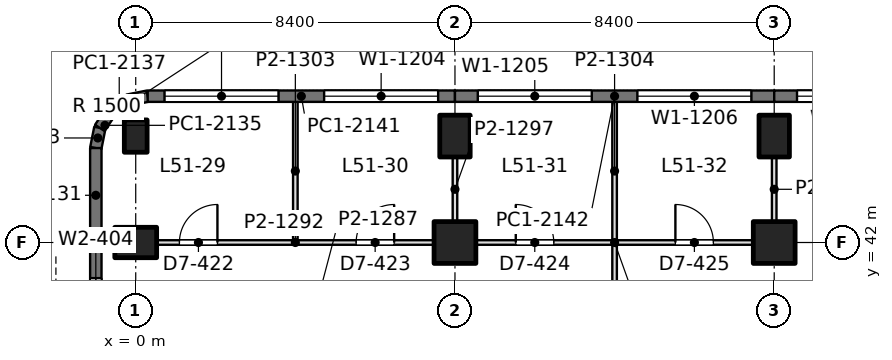
"""IFC4 building model, lengths in metres.
Left out: names, types, materials, properties, quantities, classifications, styles, units other than length and angle.
Written with IfcOpenShell. Run it as: python <this file> out.ifc"""

import sys

from ifc_helpers import new_model, si_unit, direction, frame, frame_2d, origin, origin_2d, place, context, subcontext, project, spatial, rectangle, extrude, element, fill, save


model = new_model("IFC4")
c1 = context("Model", 3, precision=1e-05, world=origin(), true_north=direction((0.0, 1.0)))
c2 = subcontext(c1, "Body", "Model", "MODEL_VIEW")
j1 = project(units=[si_unit("LENGTHUNIT", "METRE"), si_unit("PLANEANGLEUNIT", "RADIAN")], contexts=[c1])
p1 = place(None, origin())
s1 = spatial("IfcSite", under=j1, at=p1, CompositionType="ELEMENT")
p2 = place(p1, origin())
s2 = spatial("IfcBuilding", under=s1, at=p2, CompositionType="ELEMENT")
p3 = place(p2, frame((0.0, 0.0, 223.8)))
s3 = spatial("IfcBuildingStorey", under=s2, at=p3, CompositionType="ELEMENT", Elevation=223.8)
p4 = place(p3, frame((0.0, 42.0, 0.0), z_axis=(0.0, 0.0, 1.0), x_axis=(0.0, 1.0, 0.0)))
e1 = element("IfcColumn", 1, at=p4, inside=s3, PredefinedType="COLUMN", context=c2, shape_type="SweptSolid", body=[
    extrude(rectangle(XDim=0.8, YDim=1.1, at=origin_2d()), origin(), (0.0, 0.0, 1.0), 4.2),
])
p5 = place(p3, frame((0.0, 44.8, 0.0), z_axis=(0.0, 0.0, 1.0), x_axis=(1.0, 0.0, 0.0)))
e2 = element("IfcColumn", 2, at=p5, inside=s3, PredefinedType="COLUMN", context=c2, shape_type="SweptSolid", body=[
    extrude(rectangle(XDim=0.6, YDim=0.85, at=origin_2d()), origin(), (0.0, 0.0, 1.0), 4.2),
])
p6 = place(p3, frame((8.4, 42.0, 0.0), z_axis=(0.0, 0.0, 1.0), x_axis=(1.0, 0.0, 0.0)))
e3 = element("IfcColumn", 3, at=p6, inside=s3, PredefinedType="COLUMN", context=c2, shape_type="SweptSolid", body=[
    extrude(rectangle(XDim=1.1, YDim=1.1, at=origin_2d()), origin(), (0.0, 0.0, 1.0), 4.2),
])
p7 = place(p3, frame((8.4, 44.8, 0.0), z_axis=(0.0, 0.0, 1.0), x_axis=(1.0, 0.0, 0.0)))
e4 = element("IfcColumn", 4, at=p7, inside=s3, PredefinedType="COLUMN", context=c2, shape_type="SweptSolid", body=[
    extrude(rectangle(XDim=0.8, YDim=1.1, at=origin_2d()), origin(), (0.0, 0.0, 1.0), 4.2),
])
p8 = place(p3, frame((16.8, 42.0, 0.0), z_axis=(0.0, 0.0, 1.0), x_axis=(1.0, 0.0, 0.0)))
e5 = element("IfcColumn", 5, at=p8, inside=s3, PredefinedType="COLUMN", context=c2, shape_type="SweptSolid", body=[
    extrude(rectangle(XDim=1.1, YDim=1.1, at=origin_2d()), origin(), (0.0, 0.0, 1.0), 4.2),
])
p9 = place(p3, frame((16.8, 44.8, 0.0), z_axis=(0.0, 0.0, 1.0), x_axis=(1.0, 0.0, 0.0)))
e6 = element("IfcColumn", 6, at=p9, inside=s3, PredefinedType="COLUMN", context=c2, shape_type="SweptSolid", body=[
    extrude(rectangle(XDim=0.8, YDim=1.1, at=origin_2d()), origin(), (0.0, 0.0, 1.0), 4.2),
])
p10 = place(p3, frame((-1.05, 37.725, 0.0), z_axis=(0.0, 0.0, 1.0), x_axis=(0.0, 1.0, 0.0)))
e7 = element("IfcWall", 7, at=p10, inside=s3, PredefinedType="SOLIDWALL", context=c2, shape_type="SweptSolid", body=[
    extrude(rectangle(XDim=4.275, YDim=0.3, at=frame_2d((2.137, 0.0))), origin(), (0.0, 0.0, 1.0), 4.05),
])
p11 = place(p10, frame((0.938, 0.0, 0.9)))
e8 = element("IfcOpeningElement", 8, at=p11, cuts=e7, PredefinedType="OPENING", context=c2, shape_type="SweptSolid", body=[
    extrude(rectangle(XDim=2.4, YDim=1.9, at=frame_2d((1.2, 0.95))), frame((0.0, 0.16, 0.0), z_axis=(0.0, -1.0, 0.0), x_axis=(1.0, 0.0, 0.0)), (0.0, 0.0, 1.0), 0.32),
])
p12 = place(p3, frame((-1.05, 42.0, 0.0), z_axis=(0.0, 0.0, 1.0), x_axis=(0.0, 1.0, 0.0)))
e9 = element("IfcWall", 9, at=p12, inside=s3, PredefinedType="SOLIDWALL", context=c2, shape_type="SweptSolid", body=[
    extrude(rectangle(XDim=2.485, YDim=0.3, at=frame_2d((1.243, 0.0))), origin(), (0.0, 0.0, 1.0), 4.05),
])
p13 = place(p3, frame((-1.05, 44.485, 0.0), z_axis=(0.0, 0.0, 1.0), x_axis=(0.195073962632, 0.980788534345, 0.0)))
e10 = element("IfcWall", 10, at=p13, inside=s3, PredefinedType="SOLIDWALL", context=c2, shape_type="SweptSolid", body=[
    extrude(rectangle(XDim=0.541, YDim=0.3, at=frame_2d((0.271, 0.0))), origin(), (0.0, 0.0, 1.0), 4.05),
])
p14 = place(p3, frame((-0.945, 45.015, 0.0), z_axis=(0.0, 0.0, 1.0), x_axis=(0.55534295404, 0.831621430339, 0.0)))
e11 = element("IfcWall", 11, at=p14, inside=s3, PredefinedType="SOLIDWALL", context=c2, shape_type="SweptSolid", body=[
    extrude(rectangle(XDim=0.526, YDim=0.3, at=frame_2d((0.263, 0.0))), origin(), (0.0, 0.0, 1.0), 4.05),
])
p15 = place(p3, frame((-0.653, 45.453, 0.0), z_axis=(0.0, 0.0, 1.0), x_axis=(0.831692711774, 0.555236195849, 0.0)))
e12 = element("IfcWall", 12, at=p15, inside=s3, PredefinedType="SOLIDWALL", context=c2, shape_type="SweptSolid", body=[
    extrude(rectangle(XDim=0.525, YDim=0.3, at=frame_2d((0.263, 0.0))), origin(), (0.0, 0.0, 1.0), 4.05),
])
p16 = place(p3, frame((-0.216, 45.744, 0.0), z_axis=(0.0, 0.0, 1.0), x_axis=(0.980702050465, 0.1955082817, 0.0)))
e13 = element("IfcWall", 13, at=p16, inside=s3, PredefinedType="SOLIDWALL", context=c2, shape_type="SweptSolid", body=[
    extrude(rectangle(XDim=0.541, YDim=0.3, at=frame_2d((0.271, 0.0))), origin(), (0.0, 0.0, 1.0), 4.05),
])
p17 = place(p3, frame((0.315, 45.85, 0.0), z_axis=(0.0, 0.0, 1.0), x_axis=(1.0, 0.0, 0.0)))
e14 = element("IfcWall", 14, at=p17, inside=s3, PredefinedType="SOLIDWALL", context=c2, shape_type="SweptSolid", body=[
    extrude(rectangle(XDim=8.085, YDim=0.3, at=frame_2d((4.042, 0.0))), origin(), (0.0, 0.0, 1.0), 4.05),
])
p18 = place(p17, frame((0.443, 0.0, 0.9)))
e15 = element("IfcOpeningElement", 15, at=p18, cuts=e14, PredefinedType="OPENING", context=c2, shape_type="SweptSolid", body=[
    extrude(rectangle(XDim=3.0, YDim=1.9, at=frame_2d((1.5, 0.95))), frame((0.0, 0.16, 0.0), z_axis=(0.0, -1.0, 0.0), x_axis=(1.0, 0.0, 0.0)), (0.0, 0.0, 1.0), 0.32),
])
p19 = place(p17, frame((4.643, 0.0, 0.9)))
e16 = element("IfcOpeningElement", 16, at=p19, cuts=e14, PredefinedType="OPENING", context=c2, shape_type="SweptSolid", body=[
    extrude(rectangle(XDim=3.0, YDim=1.9, at=frame_2d((1.5, 0.95))), frame((0.0, 0.16, 0.0), z_axis=(0.0, -1.0, 0.0), x_axis=(1.0, 0.0, 0.0)), (0.0, 0.0, 1.0), 0.32),
])
p20 = place(p3, frame((8.4, 45.85, 0.0), z_axis=(0.0, 0.0, 1.0), x_axis=(1.0, 0.0, 0.0)))
e17 = element("IfcWall", 17, at=p20, inside=s3, PredefinedType="SOLIDWALL", context=c2, shape_type="SweptSolid", body=[
    extrude(rectangle(XDim=8.4, YDim=0.3, at=frame_2d((4.2, 0.0))), origin(), (0.0, 0.0, 1.0), 4.05),
])
p21 = place(p20, frame((0.6, 0.0, 0.9)))
e18 = element("IfcOpeningElement", 18, at=p21, cuts=e17, PredefinedType="OPENING", context=c2, shape_type="SweptSolid", body=[
    extrude(rectangle(XDim=3.0, YDim=1.9, at=frame_2d((1.5, 0.95))), frame((0.0, 0.16, 0.0), z_axis=(0.0, -1.0, 0.0), x_axis=(1.0, 0.0, 0.0)), (0.0, 0.0, 1.0), 0.32),
])
p22 = place(p20, frame((4.8, 0.0, 0.9)))
e19 = element("IfcOpeningElement", 19, at=p22, cuts=e17, PredefinedType="OPENING", context=c2, shape_type="SweptSolid", body=[
    extrude(rectangle(XDim=3.0, YDim=1.9, at=frame_2d((1.5, 0.95))), frame((0.0, 0.16, 0.0), z_axis=(0.0, -1.0, 0.0), x_axis=(1.0, 0.0, 0.0)), (0.0, 0.0, 1.0), 0.32),
])
p23 = place(p3, frame((16.8, 45.85, 0.0), z_axis=(0.0, 0.0, 1.0), x_axis=(1.0, 0.0, 0.0)))
e20 = element("IfcWall", 20, at=p23, inside=s3, PredefinedType="SOLIDWALL", context=c2, shape_type="SweptSolid", body=[
    extrude(rectangle(XDim=8.4, YDim=0.3, at=frame_2d((4.2, 0.0))), origin(), (0.0, 0.0, 1.0), 4.05),
])
p24 = place(p23, frame((0.6, 0.0, 0.9)))
e21 = element("IfcOpeningElement", 21, at=p24, cuts=e20, PredefinedType="OPENING", context=c2, shape_type="SweptSolid", body=[
    extrude(rectangle(XDim=3.0, YDim=1.9, at=frame_2d((1.5, 0.95))), frame((0.0, 0.16, 0.0), z_axis=(0.0, -1.0, 0.0), x_axis=(1.0, 0.0, 0.0)), (0.0, 0.0, 1.0), 0.32),
])
p25 = place(p23, frame((4.8, 0.0, 0.9)))
e22 = element("IfcOpeningElement", 22, at=p25, cuts=e20, PredefinedType="OPENING", context=c2, shape_type="SweptSolid", body=[
    extrude(rectangle(XDim=3.0, YDim=1.9, at=frame_2d((1.5, 0.95))), frame((0.0, 0.16, 0.0), z_axis=(0.0, -1.0, 0.0), x_axis=(1.0, 0.0, 0.0)), (0.0, 0.0, 1.0), 0.32),
])
p26 = place(p3, frame((0.549, 42.0, 0.0), z_axis=(0.0, 0.0, 1.0), x_axis=(1.0, 0.0, 0.0)))
e23 = element("IfcWall", 23, at=p26, inside=s3, PredefinedType="PARTITIONING", context=c2, shape_type="SweptSolid", body=[
    extrude(rectangle(XDim=7.302, YDim=0.12, at=frame_2d((3.651, 0.0))), origin(), (0.0, 0.0, 1.0), 3.55),
])
p27 = place(p26, frame((0.601, 0.0, 0.0)))
e24 = element("IfcOpeningElement", 24, at=p27, cuts=e23, PredefinedType="OPENING", context=c2, shape_type="SweptSolid", body=[
    extrude(rectangle(XDim=1.0, YDim=2.4, at=frame_2d((0.5, 1.2))), frame((0.0, 0.07, 0.0), z_axis=(0.0, -1.0, 0.0), x_axis=(1.0, 0.0, 0.0)), (0.0, 0.0, 1.0), 0.14),
])
p28 = place(p26, frame((5.251, 0.0, 0.0)))
e25 = element("IfcOpeningElement", 25, at=p28, cuts=e23, PredefinedType="OPENING", context=c2, shape_type="SweptSolid", body=[
    extrude(rectangle(XDim=1.0, YDim=2.4, at=frame_2d((0.5, 1.2))), frame((0.0, 0.07, 0.0), z_axis=(0.0, -1.0, 0.0), x_axis=(1.0, 0.0, 0.0)), (0.0, 0.0, 1.0), 0.14),
])
p29 = place(p3, frame((8.949, 42.0, 0.0), z_axis=(0.0, 0.0, 1.0), x_axis=(1.0, 0.0, 0.0)))
e26 = element("IfcWall", 26, at=p29, inside=s3, PredefinedType="PARTITIONING", context=c2, shape_type="SweptSolid", body=[
    extrude(rectangle(XDim=7.302, YDim=0.12, at=frame_2d((3.651, 0.0))), origin(), (0.0, 0.0, 1.0), 3.55),
])
p30 = place(p29, frame((1.051, 0.0, 0.0)))
e27 = element("IfcOpeningElement", 27, at=p30, cuts=e26, PredefinedType="OPENING", context=c2, shape_type="SweptSolid", body=[
    extrude(rectangle(XDim=1.0, YDim=2.4, at=frame_2d((0.5, 1.2))), frame((0.0, 0.07, 0.0), z_axis=(0.0, -1.0, 0.0), x_axis=(1.0, 0.0, 0.0)), (0.0, 0.0, 1.0), 0.14),
])
p31 = place(p29, frame((5.251, 0.0, 0.0)))
e28 = element("IfcOpeningElement", 28, at=p31, cuts=e26, PredefinedType="OPENING", context=c2, shape_type="SweptSolid", body=[
    extrude(rectangle(XDim=1.0, YDim=2.4, at=frame_2d((0.5, 1.2))), frame((0.0, 0.07, 0.0), z_axis=(0.0, -1.0, 0.0), x_axis=(1.0, 0.0, 0.0)), (0.0, 0.0, 1.0), 0.14),
])
p32 = place(p3, frame((4.2, 42.058, 0.0), z_axis=(0.0, 0.0, 1.0), x_axis=(0.0, 1.0, 0.0)))
e29 = element("IfcWall", 29, at=p32, inside=s3, PredefinedType="PARTITIONING", context=c2, shape_type="SweptSolid", body=[
    extrude(rectangle(XDim=3.644, YDim=0.12, at=frame_2d((1.822, 0.0))), origin(), (0.0, 0.0, 1.0), 3.55),
])
p33 = place(p3, frame((8.4, 42.549, 0.0), z_axis=(0.0, 0.0, 1.0), x_axis=(0.0, 1.0, 0.0)))
e30 = element("IfcWall", 30, at=p33, inside=s3, PredefinedType="PARTITIONING", context=c2, shape_type="SweptSolid", body=[
    extrude(rectangle(XDim=1.702, YDim=0.12, at=frame_2d((0.851, 0.0))), origin(), (0.0, 0.0, 1.0), 3.69),
])
p34 = place(p3, frame((12.6, 42.058, 0.0), z_axis=(0.0, 0.0, 1.0), x_axis=(0.0, 1.0, 0.0)))
e31 = element("IfcWall", 31, at=p34, inside=s3, PredefinedType="PARTITIONING", context=c2, shape_type="SweptSolid", body=[
    extrude(rectangle(XDim=3.644, YDim=0.12, at=frame_2d((1.822, 0.0))), origin(), (0.0, 0.0, 1.0), 3.55),
])
p35 = place(p3, frame((16.8, 42.549, 0.0), z_axis=(0.0, 0.0, 1.0), x_axis=(0.0, 1.0, 0.0)))
e32 = element("IfcWall", 32, at=p35, inside=s3, PredefinedType="PARTITIONING", context=c2, shape_type="SweptSolid", body=[
    extrude(rectangle(XDim=1.702, YDim=0.12, at=frame_2d((0.851, 0.0))), origin(), (0.0, 0.0, 1.0), 3.69),
])
p36 = place(p3, frame((12.6, 39.358, 0.0), z_axis=(0.0, 0.0, 1.0), x_axis=(0.0, 1.0, 0.0)))
e33 = element("IfcWall", 33, at=p36, inside=s3, PredefinedType="PARTITIONING", context=c2, shape_type="SweptSolid", body=[
    extrude(rectangle(XDim=2.584, YDim=0.12, at=frame_2d((1.292, 0.0))), origin(), (0.0, 0.0, 1.0), 3.55),
])
p37 = place(p11, origin())
e34 = element("IfcWindow", 34, at=p37, inside=s3, PartitioningType="SINGLE_PANEL", PredefinedType="WINDOW", context=c2, shape_type="SweptSolid", body=[
    extrude(rectangle(XDim=2.4, YDim=1.9, at=frame_2d((1.2, 0.95))), frame((0.0, 0.03, 0.0), z_axis=(0.0, -1.0, 0.0), x_axis=(1.0, 0.0, 0.0)), (0.0, 0.0, 1.0), 0.06),
])
fill(e8, e34)
p38 = place(p18, origin())
e35 = element("IfcWindow", 35, at=p38, inside=s3, PartitioningType="SINGLE_PANEL", PredefinedType="WINDOW", context=c2, shape_type="SweptSolid", body=[
    extrude(rectangle(XDim=3.0, YDim=1.9, at=frame_2d((1.5, 0.95))), frame((0.0, 0.03, 0.0), z_axis=(0.0, -1.0, 0.0), x_axis=(1.0, 0.0, 0.0)), (0.0, 0.0, 1.0), 0.06),
])
fill(e15, e35)
p39 = place(p19, origin())
e36 = element("IfcWindow", 36, at=p39, inside=s3, PartitioningType="SINGLE_PANEL", PredefinedType="WINDOW", context=c2, shape_type="SweptSolid", body=[
    extrude(rectangle(XDim=3.0, YDim=1.9, at=frame_2d((1.5, 0.95))), frame((0.0, 0.03, 0.0), z_axis=(0.0, -1.0, 0.0), x_axis=(1.0, 0.0, 0.0)), (0.0, 0.0, 1.0), 0.06),
])
fill(e16, e36)
p40 = place(p21, origin())
e37 = element("IfcWindow", 37, at=p40, inside=s3, PartitioningType="SINGLE_PANEL", PredefinedType="WINDOW", context=c2, shape_type="SweptSolid", body=[
    extrude(rectangle(XDim=3.0, YDim=1.9, at=frame_2d((1.5, 0.95))), frame((0.0, 0.03, 0.0), z_axis=(0.0, -1.0, 0.0), x_axis=(1.0, 0.0, 0.0)), (0.0, 0.0, 1.0), 0.06),
])
fill(e18, e37)
p41 = place(p22, origin())
e38 = element("IfcWindow", 38, at=p41, inside=s3, PartitioningType="SINGLE_PANEL", PredefinedType="WINDOW", context=c2, shape_type="SweptSolid", body=[
    extrude(rectangle(XDim=3.0, YDim=1.9, at=frame_2d((1.5, 0.95))), frame((0.0, 0.03, 0.0), z_axis=(0.0, -1.0, 0.0), x_axis=(1.0, 0.0, 0.0)), (0.0, 0.0, 1.0), 0.06),
])
fill(e19, e38)
p42 = place(p24, origin())
e39 = element("IfcWindow", 39, at=p42, inside=s3, PartitioningType="SINGLE_PANEL", PredefinedType="WINDOW", context=c2, shape_type="SweptSolid", body=[
    extrude(rectangle(XDim=3.0, YDim=1.9, at=frame_2d((1.5, 0.95))), frame((0.0, 0.03, 0.0), z_axis=(0.0, -1.0, 0.0), x_axis=(1.0, 0.0, 0.0)), (0.0, 0.0, 1.0), 0.06),
])
fill(e21, e39)
p43 = place(p27, origin())
e40 = element("IfcDoor", 40, at=p43, inside=s3, OperationType="SINGLE_SWING_RIGHT", PredefinedType="DOOR", context=c2, shape_type="SweptSolid", body=[
    extrude(rectangle(XDim=1.0, YDim=2.4, at=frame_2d((0.5, 1.2))), frame((0.0, 0.025, 0.0), z_axis=(0.0, -1.0, 0.0), x_axis=(1.0, 0.0, 0.0)), (0.0, 0.0, 1.0), 0.05),
])
fill(e24, e40)
p44 = place(p28, origin())
e41 = element("IfcDoor", 41, at=p44, inside=s3, OperationType="SINGLE_SWING_RIGHT", PredefinedType="DOOR", context=c2, shape_type="SweptSolid", body=[
    extrude(rectangle(XDim=1.0, YDim=2.4, at=frame_2d((0.5, 1.2))), frame((0.0, 0.025, 0.0), z_axis=(0.0, -1.0, 0.0), x_axis=(1.0, 0.0, 0.0)), (0.0, 0.0, 1.0), 0.05),
])
fill(e25, e41)
p45 = place(p30, origin())
e42 = element("IfcDoor", 42, at=p45, inside=s3, OperationType="SINGLE_SWING_LEFT", PredefinedType="DOOR", context=c2, shape_type="SweptSolid", body=[
    extrude(rectangle(XDim=1.0, YDim=2.4, at=frame_2d((0.5, 1.2))), frame((0.0, 0.025, 0.0), z_axis=(0.0, -1.0, 0.0), x_axis=(1.0, 0.0, 0.0)), (0.0, 0.0, 1.0), 0.05),
])
fill(e27, e42)
p46 = place(p31, origin())
e43 = element("IfcDoor", 43, at=p46, inside=s3, OperationType="SINGLE_SWING_LEFT", PredefinedType="DOOR", context=c2, shape_type="SweptSolid", body=[
    extrude(rectangle(XDim=1.0, YDim=2.4, at=frame_2d((0.5, 1.2))), frame((0.0, 0.025, 0.0), z_axis=(0.0, -1.0, 0.0), x_axis=(1.0, 0.0, 0.0)), (0.0, 0.0, 1.0), 0.05),
])
fill(e28, e43)
save(model, sys.argv[1])
